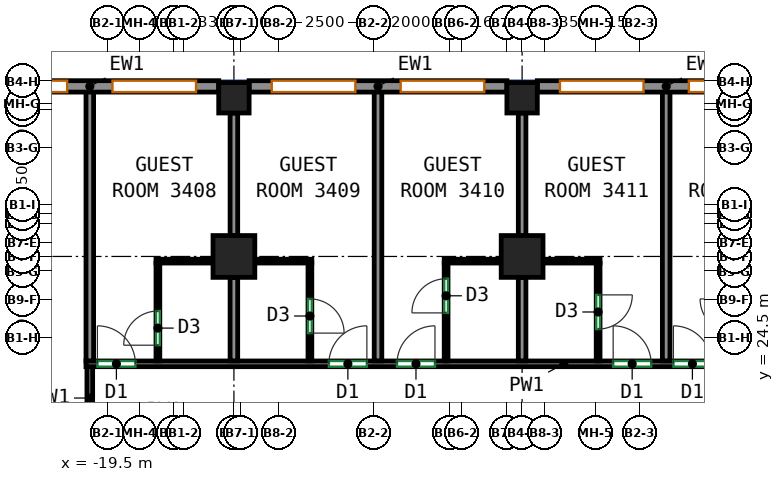
"""IFC4 building model, lengths in metres.
Left out: names, types, materials, properties, quantities, classifications, styles, units other than length and angle.
Written with IfcOpenShell. Run it as: python <this file> out.ifc"""

import sys

from ifc_helpers import new_model, si_unit, direction, frame, frame_2d, origin, origin_2d, place, context, subcontext, project, spatial, rectangle, extrude, source, transform, mapped, element, fill, save


model = new_model("IFC4")
c1 = context("Model", 3, precision=1e-05, world=origin(), true_north=direction((0.0, 1.0)))
c2 = subcontext(c1, "Body", "Model", "MODEL_VIEW")
j1 = project(units=[si_unit("LENGTHUNIT", "METRE"), si_unit("PLANEANGLEUNIT", "RADIAN")], contexts=[c1])
p1 = place(None, origin())
s1 = spatial("IfcSite", under=j1, at=p1, CompositionType="ELEMENT")
p2 = place(p1, origin())
s2 = spatial("IfcBuilding", under=s1, at=p2, CompositionType="ELEMENT")
p3 = place(p2, frame((0.0, 0.0, 150.7)))
s3 = spatial("IfcBuildingStorey", under=s2, at=p3, CompositionType="ELEMENT", Elevation=150.7)
m1 = source(origin(), c2, "Body", "SweptSolid", [
    extrude(rectangle(XDim=1.1, YDim=1.1, at=origin_2d()), origin(), (0.0, 0.0, 1.0), 3.12),
])
p4 = place(p3, frame((-16.167, 26.625, 0.0), z_axis=(0.0, 0.0, 1.0), x_axis=(1.0, 0.0, 0.0)))
e1 = element("IfcColumn", 1, at=p4, inside=s3, PredefinedType="COLUMN", context=c2, shape_type="MappedRepresentation", body=[
    mapped(m1, transform((0.0, 0.0, 0.0))),
])
m2 = source(origin(), c2, "Body", "SweptSolid", [
    extrude(rectangle(XDim=0.8, YDim=0.8, at=origin_2d()), origin(), (0.0, 0.0, 1.0), 3.12),
])
p5 = place(p3, frame((-16.167, 30.8, 0.0), z_axis=(0.0, 0.0, 1.0), x_axis=(1.0, 0.0, 0.0)))
e2 = element("IfcColumn", 2, at=p5, inside=s3, PredefinedType="COLUMN", context=c2, shape_type="MappedRepresentation", body=[
    mapped(m2, transform((0.0, 0.0, 0.0))),
])
p6 = place(p3, frame((-8.583, 26.625, 0.0), z_axis=(0.0, 0.0, 1.0), x_axis=(1.0, 0.0, 0.0)))
e3 = element("IfcColumn", 3, at=p6, inside=s3, PredefinedType="COLUMN", context=c2, shape_type="MappedRepresentation", body=[
    mapped(m1, transform((0.0, 0.0, 0.0))),
])
p7 = place(p3, frame((-8.583, 30.8, 0.0), z_axis=(0.0, 0.0, 1.0), x_axis=(1.0, 0.0, 0.0)))
e4 = element("IfcColumn", 4, at=p7, inside=s3, PredefinedType="COLUMN", context=c2, shape_type="MappedRepresentation", body=[
    mapped(m2, transform((0.0, 0.0, 0.0))),
])
m3 = source(origin(), c2, "Body", "SweptSolid", [
    extrude(rectangle(XDim=6.783, YDim=0.3, at=frame_2d((3.392, 0.0))), origin(), (0.0, 0.0, 1.0), 3.12),
])
p8 = place(p3, frame((-1.4, 31.1, 0.0), z_axis=(0.0, 0.0, 1.0), x_axis=(-1.0, 0.0, 0.0)))
e5 = element("IfcWall", 5, at=p8, inside=s3, PredefinedType="SOLIDWALL", context=c2, shape_type="MappedRepresentation", body=[
    mapped(m3, transform((0.0, 0.0, 0.0))),
])
p9 = place(p8, frame((0.596, 0.0, 0.85)))
e6 = element("IfcOpeningElement", 6, at=p9, cuts=e5, PredefinedType="OPENING", context=c2, shape_type="SweptSolid", body=[
    extrude(rectangle(XDim=2.2, YDim=1.95, at=frame_2d((1.1, 0.975))), frame((0.0, 0.16, 0.0), z_axis=(0.0, -1.0, 0.0), x_axis=(1.0, 0.0, 0.0)), (0.0, 0.0, 1.0), 0.32),
])
p10 = place(p8, frame((3.988, 0.0, 0.85)))
e7 = element("IfcOpeningElement", 7, at=p10, cuts=e5, PredefinedType="OPENING", context=c2, shape_type="SweptSolid", body=[
    extrude(rectangle(XDim=2.2, YDim=1.95, at=frame_2d((1.1, 0.975))), frame((0.0, 0.16, 0.0), z_axis=(0.0, -1.0, 0.0), x_axis=(1.0, 0.0, 0.0)), (0.0, 0.0, 1.0), 0.32),
])
m4 = source(origin(), c2, "Body", "SweptSolid", [
    extrude(rectangle(XDim=6.783, YDim=0.3, at=frame_2d((3.392, 0.0))), origin(), (0.0, 0.0, 1.0), 3.12),
])
p11 = place(p3, frame((-8.983, 31.1, 0.0), z_axis=(0.0, 0.0, 1.0), x_axis=(-1.0, 0.0, 0.0)))
e8 = element("IfcWall", 8, at=p11, inside=s3, PredefinedType="SOLIDWALL", context=c2, shape_type="MappedRepresentation", body=[
    mapped(m4, transform((0.0, 0.0, 0.0))),
])
p12 = place(p11, frame((0.596, 0.0, 0.85)))
e9 = element("IfcOpeningElement", 9, at=p12, cuts=e8, PredefinedType="OPENING", context=c2, shape_type="SweptSolid", body=[
    extrude(rectangle(XDim=2.2, YDim=1.95, at=frame_2d((1.1, 0.975))), frame((0.0, 0.16, 0.0), z_axis=(0.0, -1.0, 0.0), x_axis=(1.0, 0.0, 0.0)), (0.0, 0.0, 1.0), 0.32),
])
p13 = place(p11, frame((3.988, 0.0, 0.85)))
e10 = element("IfcOpeningElement", 10, at=p13, cuts=e8, PredefinedType="OPENING", context=c2, shape_type="SweptSolid", body=[
    extrude(rectangle(XDim=2.2, YDim=1.95, at=frame_2d((1.1, 0.975))), frame((0.0, 0.16, 0.0), z_axis=(0.0, -1.0, 0.0), x_axis=(1.0, 0.0, 0.0)), (0.0, 0.0, 1.0), 0.32),
])
p14 = place(p3, frame((-16.567, 31.1, 0.0), z_axis=(0.0, 0.0, 1.0), x_axis=(-1.0, 0.0, 0.0)))
e11 = element("IfcWall", 11, at=p14, inside=s3, PredefinedType="SOLIDWALL", context=c2, shape_type="MappedRepresentation", body=[
    mapped(m3, transform((0.0, 0.0, 0.0))),
])
p15 = place(p14, frame((0.596, 0.0, 0.85)))
e12 = element("IfcOpeningElement", 12, at=p15, cuts=e11, PredefinedType="OPENING", context=c2, shape_type="SweptSolid", body=[
    extrude(rectangle(XDim=2.2, YDim=1.95, at=frame_2d((1.1, 0.975))), frame((0.0, 0.16, 0.0), z_axis=(0.0, -1.0, 0.0), x_axis=(1.0, 0.0, 0.0)), (0.0, 0.0, 1.0), 0.32),
])
p16 = place(p14, frame((3.988, 0.0, 0.85)))
e13 = element("IfcOpeningElement", 13, at=p16, cuts=e11, PredefinedType="OPENING", context=c2, shape_type="SweptSolid", body=[
    extrude(rectangle(XDim=2.2, YDim=1.95, at=frame_2d((1.1, 0.975))), frame((0.0, 0.16, 0.0), z_axis=(0.0, -1.0, 0.0), x_axis=(1.0, 0.0, 0.0)), (0.0, 0.0, 1.0), 0.32),
])
p17 = place(p3, frame((-19.959, 22.075, 0.0), z_axis=(0.0, 0.0, 1.0), x_axis=(0.0, 1.0, 0.0)))
e14 = element("IfcWall", 14, at=p17, inside=s3, PredefinedType="PARTITIONING", context=c2, shape_type="SweptSolid", body=[
    extrude(rectangle(XDim=1.65, YDim=0.15, at=frame_2d((0.825, 0.0))), origin(), (0.0, 0.0, 1.0), 3.12),
])
p18 = place(p3, frame((-20.059, 23.8, 0.0), z_axis=(0.0, 0.0, 1.0), x_axis=(1.0, 0.0, 0.0)))
e15 = element("IfcWall", 15, at=p18, inside=s3, PredefinedType="PARTITIONING", context=c2, shape_type="SweptSolid", body=[
    extrude(rectangle(XDim=41.909, YDim=0.15, at=frame_2d((20.955, 0.0))), origin(), (0.0, 0.0, 1.0), 3.12),
])
p19 = place(p18, frame((0.3, 0.0, 0.0)))
e16 = element("IfcOpeningElement", 16, at=p19, cuts=e15, PredefinedType="OPENING", context=c2, shape_type="SweptSolid", body=[
    extrude(rectangle(XDim=1.0, YDim=2.1, at=frame_2d((0.5, 1.05))), frame((0.0, 0.085, 0.0), z_axis=(0.0, -1.0, 0.0), x_axis=(1.0, 0.0, 0.0)), (0.0, 0.0, 1.0), 0.17),
])
p20 = place(p18, frame((6.391, 0.0, 0.0)))
e17 = element("IfcOpeningElement", 17, at=p20, cuts=e15, PredefinedType="OPENING", context=c2, shape_type="SweptSolid", body=[
    extrude(rectangle(XDim=1.0, YDim=2.1, at=frame_2d((0.5, 1.05))), frame((0.0, 0.085, 0.0), z_axis=(0.0, -1.0, 0.0), x_axis=(1.0, 0.0, 0.0)), (0.0, 0.0, 1.0), 0.17),
])
p21 = place(p18, frame((8.183, 0.0, 0.0)))
e18 = element("IfcOpeningElement", 18, at=p21, cuts=e15, PredefinedType="OPENING", context=c2, shape_type="SweptSolid", body=[
    extrude(rectangle(XDim=1.0, YDim=2.1, at=frame_2d((0.5, 1.05))), frame((0.0, 0.085, 0.0), z_axis=(0.0, -1.0, 0.0), x_axis=(1.0, 0.0, 0.0)), (0.0, 0.0, 1.0), 0.17),
])
p22 = place(p18, frame((13.872, 0.0, 0.0)))
e19 = element("IfcOpeningElement", 19, at=p22, cuts=e15, PredefinedType="OPENING", context=c2, shape_type="SweptSolid", body=[
    extrude(rectangle(XDim=1.0, YDim=2.1, at=frame_2d((0.5, 1.05))), frame((0.0, 0.085, 0.0), z_axis=(0.0, -1.0, 0.0), x_axis=(1.0, 0.0, 0.0)), (0.0, 0.0, 1.0), 0.17),
])
p23 = place(p18, frame((15.457, 0.0, 0.0)))
e20 = element("IfcOpeningElement", 20, at=p23, cuts=e15, PredefinedType="OPENING", context=c2, shape_type="SweptSolid", body=[
    extrude(rectangle(XDim=1.0, YDim=2.1, at=frame_2d((0.5, 1.05))), frame((0.0, 0.085, 0.0), z_axis=(0.0, -1.0, 0.0), x_axis=(1.0, 0.0, 0.0)), (0.0, 0.0, 1.0), 0.17),
])
p24 = place(p18, frame((21.199, 0.0, 0.0)))
e21 = element("IfcOpeningElement", 21, at=p24, cuts=e15, PredefinedType="OPENING", context=c2, shape_type="SweptSolid", body=[
    extrude(rectangle(XDim=1.0, YDim=2.1, at=frame_2d((0.5, 1.05))), frame((0.0, 0.085, 0.0), z_axis=(0.0, -1.0, 0.0), x_axis=(1.0, 0.0, 0.0)), (0.0, 0.0, 1.0), 0.17),
])
p25 = place(p18, frame((23.212, 0.0, 0.0)))
e22 = element("IfcOpeningElement", 22, at=p25, cuts=e15, PredefinedType="OPENING", context=c2, shape_type="SweptSolid", body=[
    extrude(rectangle(XDim=1.0, YDim=2.1, at=frame_2d((0.5, 1.05))), frame((0.0, 0.085, 0.0), z_axis=(0.0, -1.0, 0.0), x_axis=(1.0, 0.0, 0.0)), (0.0, 0.0, 1.0), 0.17),
])
p26 = place(p18, frame((28.832, 0.0, 0.0)))
e23 = element("IfcOpeningElement", 23, at=p26, cuts=e15, PredefinedType="OPENING", context=c2, shape_type="SweptSolid", body=[
    extrude(rectangle(XDim=1.0, YDim=2.1, at=frame_2d((0.5, 1.05))), frame((0.0, 0.085, 0.0), z_axis=(0.0, -1.0, 0.0), x_axis=(1.0, 0.0, 0.0)), (0.0, 0.0, 1.0), 0.17),
])
p27 = place(p18, frame((30.83, 0.0, 0.0)))
e24 = element("IfcOpeningElement", 24, at=p27, cuts=e15, PredefinedType="OPENING", context=c2, shape_type="SweptSolid", body=[
    extrude(rectangle(XDim=1.0, YDim=2.1, at=frame_2d((0.5, 1.05))), frame((0.0, 0.085, 0.0), z_axis=(0.0, -1.0, 0.0), x_axis=(1.0, 0.0, 0.0)), (0.0, 0.0, 1.0), 0.17),
])
p28 = place(p18, frame((36.519, 0.0, 0.0)))
e25 = element("IfcOpeningElement", 25, at=p28, cuts=e15, PredefinedType="OPENING", context=c2, shape_type="SweptSolid", body=[
    extrude(rectangle(XDim=1.0, YDim=2.1, at=frame_2d((0.5, 1.05))), frame((0.0, 0.085, 0.0), z_axis=(0.0, -1.0, 0.0), x_axis=(1.0, 0.0, 0.0)), (0.0, 0.0, 1.0), 0.17),
])
p29 = place(p18, frame((38.311, 0.0, 0.0)))
e26 = element("IfcOpeningElement", 26, at=p29, cuts=e15, PredefinedType="OPENING", context=c2, shape_type="SweptSolid", body=[
    extrude(rectangle(XDim=1.0, YDim=2.1, at=frame_2d((0.5, 1.05))), frame((0.0, 0.085, 0.0), z_axis=(0.0, -1.0, 0.0), x_axis=(1.0, 0.0, 0.0)), (0.0, 0.0, 1.0), 0.17),
])
p30 = place(p3, frame((-19.959, 23.877, 0.0), z_axis=(0.0, 0.0, 1.0), x_axis=(0.0, 1.0, 0.0)))
e27 = element("IfcWall", 27, at=p30, inside=s3, PredefinedType="PARTITIONING", context=c2, shape_type="SweptSolid", body=[
    extrude(rectangle(XDim=7.123, YDim=0.2, at=frame_2d((3.562, 0.0))), origin(), (0.0, 0.0, 1.0), 3.12),
])
p31 = place(p3, frame((-18.217, 26.502, 0.0), z_axis=(0.0, 0.0, 1.0), x_axis=(1.0, 0.0, 0.0)))
e28 = element("IfcWall", 28, at=p31, inside=s3, PredefinedType="PARTITIONING", context=c2, shape_type="SweptSolid", body=[
    extrude(rectangle(XDim=1.5, YDim=0.1, at=frame_2d((0.75, 0.0))), origin(), (0.0, 0.0, 1.0), 3.12),
])
p32 = place(p3, frame((-18.167, 23.877, 0.0), z_axis=(0.0, 0.0, 1.0), x_axis=(0.0, 1.0, 0.0)))
e29 = element("IfcWall", 29, at=p32, inside=s3, PredefinedType="PARTITIONING", context=c2, shape_type="SweptSolid", body=[
    extrude(rectangle(XDim=2.575, YDim=0.1, at=frame_2d((1.288, 0.0))), origin(), (0.0, 0.0, 1.0), 3.12),
])
p33 = place(p32, frame((0.413, 0.0, 0.0)))
e30 = element("IfcOpeningElement", 30, at=p33, cuts=e29, PredefinedType="OPENING", context=c2, shape_type="SweptSolid", body=[
    extrude(rectangle(XDim=0.9, YDim=2.1, at=frame_2d((0.45, 1.05))), frame((0.0, 0.06, 0.0), z_axis=(0.0, -1.0, 0.0), x_axis=(1.0, 0.0, 0.0)), (0.0, 0.0, 1.0), 0.12),
])
p34 = place(p3, frame((-16.167, 27.175, 0.0), z_axis=(0.0, 0.0, 1.0), x_axis=(0.0, 1.0, 0.0)))
e31 = element("IfcWall", 31, at=p34, inside=s3, PredefinedType="PARTITIONING", context=c2, shape_type="SweptSolid", body=[
    extrude(rectangle(XDim=3.225, YDim=0.2, at=frame_2d((1.612, 0.0))), origin(), (0.0, 0.0, 1.0), 3.12),
])
p35 = place(p3, frame((-16.167, 23.877, 0.0), z_axis=(0.0, 0.0, 1.0), x_axis=(0.0, 1.0, 0.0)))
e32 = element("IfcWall", 32, at=p35, inside=s3, PredefinedType="PARTITIONING", context=c2, shape_type="SweptSolid", body=[
    extrude(rectangle(XDim=2.198, YDim=0.2, at=frame_2d((1.099, 0.0))), origin(), (0.0, 0.0, 1.0), 3.12),
])
p36 = place(p3, frame((-15.617, 26.502, 0.0), z_axis=(0.0, 0.0, 1.0), x_axis=(1.0, 0.0, 0.0)))
e33 = element("IfcWall", 33, at=p36, inside=s3, PredefinedType="PARTITIONING", context=c2, shape_type="SweptSolid", body=[
    extrude(rectangle(XDim=1.5, YDim=0.1, at=frame_2d((0.75, 0.0))), origin(), (0.0, 0.0, 1.0), 3.12),
])
p37 = place(p3, frame((-14.167, 26.452, 0.0), z_axis=(0.0, 0.0, 1.0), x_axis=(0.0, -1.0, 0.0)))
e34 = element("IfcWall", 34, at=p37, inside=s3, PredefinedType="PARTITIONING", context=c2, shape_type="SweptSolid", body=[
    extrude(rectangle(XDim=2.575, YDim=0.1, at=frame_2d((1.288, 0.0))), origin(), (0.0, 0.0, 1.0), 3.12),
])
p38 = place(p37, frame((0.944, 0.0, 0.0)))
e35 = element("IfcOpeningElement", 35, at=p38, cuts=e34, PredefinedType="OPENING", context=c2, shape_type="SweptSolid", body=[
    extrude(rectangle(XDim=0.9, YDim=2.1, at=frame_2d((0.45, 1.05))), frame((0.0, 0.06, 0.0), z_axis=(0.0, -1.0, 0.0), x_axis=(1.0, 0.0, 0.0)), (0.0, 0.0, 1.0), 0.12),
])
p39 = place(p3, frame((-12.375, 23.877, 0.0), z_axis=(0.0, 0.0, 1.0), x_axis=(0.0, 1.0, 0.0)))
e36 = element("IfcWall", 36, at=p39, inside=s3, PredefinedType="PARTITIONING", context=c2, shape_type="SweptSolid", body=[
    extrude(rectangle(XDim=7.123, YDim=0.2, at=frame_2d((3.562, 0.0))), origin(), (0.0, 0.0, 1.0), 3.12),
])
p40 = place(p3, frame((-10.633, 26.502, 0.0), z_axis=(0.0, 0.0, 1.0), x_axis=(1.0, 0.0, 0.0)))
e37 = element("IfcWall", 37, at=p40, inside=s3, PredefinedType="PARTITIONING", context=c2, shape_type="SweptSolid", body=[
    extrude(rectangle(XDim=1.5, YDim=0.1, at=frame_2d((0.75, 0.0))), origin(), (0.0, 0.0, 1.0), 3.12),
])
p41 = place(p3, frame((-10.583, 23.877, 0.0), z_axis=(0.0, 0.0, 1.0), x_axis=(0.0, 1.0, 0.0)))
e38 = element("IfcWall", 38, at=p41, inside=s3, PredefinedType="PARTITIONING", context=c2, shape_type="SweptSolid", body=[
    extrude(rectangle(XDim=2.575, YDim=0.1, at=frame_2d((1.288, 0.0))), origin(), (0.0, 0.0, 1.0), 3.12),
])
p42 = place(p41, frame((1.263, 0.0, 0.0)))
e39 = element("IfcOpeningElement", 39, at=p42, cuts=e38, PredefinedType="OPENING", context=c2, shape_type="SweptSolid", body=[
    extrude(rectangle(XDim=0.9, YDim=2.1, at=frame_2d((0.45, 1.05))), frame((0.0, 0.06, 0.0), z_axis=(0.0, -1.0, 0.0), x_axis=(1.0, 0.0, 0.0)), (0.0, 0.0, 1.0), 0.12),
])
p43 = place(p3, frame((-8.583, 27.175, 0.0), z_axis=(0.0, 0.0, 1.0), x_axis=(0.0, 1.0, 0.0)))
e40 = element("IfcWall", 40, at=p43, inside=s3, PredefinedType="PARTITIONING", context=c2, shape_type="SweptSolid", body=[
    extrude(rectangle(XDim=3.225, YDim=0.2, at=frame_2d((1.612, 0.0))), origin(), (0.0, 0.0, 1.0), 3.12),
])
p44 = place(p3, frame((-8.583, 23.877, 0.0), z_axis=(0.0, 0.0, 1.0), x_axis=(0.0, 1.0, 0.0)))
e41 = element("IfcWall", 41, at=p44, inside=s3, PredefinedType="PARTITIONING", context=c2, shape_type="SweptSolid", body=[
    extrude(rectangle(XDim=2.198, YDim=0.2, at=frame_2d((1.099, 0.0))), origin(), (0.0, 0.0, 1.0), 3.12),
])
p45 = place(p3, frame((-8.033, 26.502, 0.0), z_axis=(0.0, 0.0, 1.0), x_axis=(1.0, 0.0, 0.0)))
e42 = element("IfcWall", 42, at=p45, inside=s3, PredefinedType="PARTITIONING", context=c2, shape_type="SweptSolid", body=[
    extrude(rectangle(XDim=1.5, YDim=0.1, at=frame_2d((0.75, 0.0))), origin(), (0.0, 0.0, 1.0), 3.12),
])
p46 = place(p3, frame((-6.583, 26.452, 0.0), z_axis=(0.0, 0.0, 1.0), x_axis=(0.0, -1.0, 0.0)))
e43 = element("IfcWall", 43, at=p46, inside=s3, PredefinedType="PARTITIONING", context=c2, shape_type="SweptSolid", body=[
    extrude(rectangle(XDim=2.575, YDim=0.1, at=frame_2d((1.288, 0.0))), origin(), (0.0, 0.0, 1.0), 3.12),
])
p47 = place(p46, frame((0.838, 0.0, 0.0)))
e44 = element("IfcOpeningElement", 44, at=p47, cuts=e43, PredefinedType="OPENING", context=c2, shape_type="SweptSolid", body=[
    extrude(rectangle(XDim=0.9, YDim=2.1, at=frame_2d((0.45, 1.05))), frame((0.0, 0.06, 0.0), z_axis=(0.0, -1.0, 0.0), x_axis=(1.0, 0.0, 0.0)), (0.0, 0.0, 1.0), 0.12),
])
p48 = place(p3, frame((-4.792, 23.877, 0.0), z_axis=(0.0, 0.0, 1.0), x_axis=(0.0, 1.0, 0.0)))
e45 = element("IfcWall", 45, at=p48, inside=s3, PredefinedType="PARTITIONING", context=c2, shape_type="SweptSolid", body=[
    extrude(rectangle(XDim=7.123, YDim=0.2, at=frame_2d((3.562, 0.0))), origin(), (0.0, 0.0, 1.0), 3.12),
])
p49 = place(p9, origin())
e46 = element("IfcWindow", 46, at=p49, inside=s3, PartitioningType="SINGLE_PANEL", PredefinedType="WINDOW", context=c2, shape_type="SweptSolid", body=[
    extrude(rectangle(XDim=2.2, YDim=1.95, at=frame_2d((1.1, 0.975))), frame((0.0, 0.03, 0.0), z_axis=(0.0, -1.0, 0.0), x_axis=(1.0, 0.0, 0.0)), (0.0, 0.0, 1.0), 0.06),
])
fill(e6, e46)
p50 = place(p10, origin())
e47 = element("IfcWindow", 47, at=p50, inside=s3, PartitioningType="SINGLE_PANEL", PredefinedType="WINDOW", context=c2, shape_type="SweptSolid", body=[
    extrude(rectangle(XDim=2.2, YDim=1.95, at=frame_2d((1.1, 0.975))), frame((0.0, 0.03, 0.0), z_axis=(0.0, -1.0, 0.0), x_axis=(1.0, 0.0, 0.0)), (0.0, 0.0, 1.0), 0.06),
])
fill(e7, e47)
p51 = place(p12, origin())
e48 = element("IfcWindow", 48, at=p51, inside=s3, PartitioningType="SINGLE_PANEL", PredefinedType="WINDOW", context=c2, shape_type="SweptSolid", body=[
    extrude(rectangle(XDim=2.2, YDim=1.95, at=frame_2d((1.1, 0.975))), frame((0.0, 0.03, 0.0), z_axis=(0.0, -1.0, 0.0), x_axis=(1.0, 0.0, 0.0)), (0.0, 0.0, 1.0), 0.06),
])
fill(e9, e48)
p52 = place(p13, origin())
e49 = element("IfcWindow", 49, at=p52, inside=s3, PartitioningType="SINGLE_PANEL", PredefinedType="WINDOW", context=c2, shape_type="SweptSolid", body=[
    extrude(rectangle(XDim=2.2, YDim=1.95, at=frame_2d((1.1, 0.975))), frame((0.0, 0.03, 0.0), z_axis=(0.0, -1.0, 0.0), x_axis=(1.0, 0.0, 0.0)), (0.0, 0.0, 1.0), 0.06),
])
fill(e10, e49)
p53 = place(p15, origin())
e50 = element("IfcWindow", 50, at=p53, inside=s3, PartitioningType="SINGLE_PANEL", PredefinedType="WINDOW", context=c2, shape_type="SweptSolid", body=[
    extrude(rectangle(XDim=2.2, YDim=1.95, at=frame_2d((1.1, 0.975))), frame((0.0, 0.03, 0.0), z_axis=(0.0, -1.0, 0.0), x_axis=(1.0, 0.0, 0.0)), (0.0, 0.0, 1.0), 0.06),
])
fill(e12, e50)
p54 = place(p16, origin())
e51 = element("IfcWindow", 51, at=p54, inside=s3, PartitioningType="SINGLE_PANEL", PredefinedType="WINDOW", context=c2, shape_type="SweptSolid", body=[
    extrude(rectangle(XDim=2.2, YDim=1.95, at=frame_2d((1.1, 0.975))), frame((0.0, 0.03, 0.0), z_axis=(0.0, -1.0, 0.0), x_axis=(1.0, 0.0, 0.0)), (0.0, 0.0, 1.0), 0.06),
])
fill(e13, e51)
p55 = place(p19, origin())
e52 = element("IfcDoor", 52, at=p55, inside=s3, OperationType="SINGLE_SWING_LEFT", PredefinedType="DOOR", context=c2, shape_type="SweptSolid", body=[
    extrude(rectangle(XDim=1.0, YDim=2.1, at=frame_2d((0.5, 1.05))), frame((0.0, 0.025, 0.0), z_axis=(0.0, -1.0, 0.0), x_axis=(1.0, 0.0, 0.0)), (0.0, 0.0, 1.0), 0.05),
])
fill(e16, e52)
p56 = place(p20, origin())
e53 = element("IfcDoor", 53, at=p56, inside=s3, OperationType="SINGLE_SWING_RIGHT", PredefinedType="DOOR", context=c2, shape_type="SweptSolid", body=[
    extrude(rectangle(XDim=1.0, YDim=2.1, at=frame_2d((0.5, 1.05))), frame((0.0, 0.025, 0.0), z_axis=(0.0, -1.0, 0.0), x_axis=(1.0, 0.0, 0.0)), (0.0, 0.0, 1.0), 0.05),
])
fill(e17, e53)
p57 = place(p21, origin())
e54 = element("IfcDoor", 54, at=p57, inside=s3, OperationType="SINGLE_SWING_RIGHT", PredefinedType="DOOR", context=c2, shape_type="SweptSolid", body=[
    extrude(rectangle(XDim=1.0, YDim=2.1, at=frame_2d((0.5, 1.05))), frame((0.0, 0.025, 0.0), z_axis=(0.0, -1.0, 0.0), x_axis=(1.0, 0.0, 0.0)), (0.0, 0.0, 1.0), 0.05),
])
fill(e18, e54)
p58 = place(p22, origin())
e55 = element("IfcDoor", 55, at=p58, inside=s3, OperationType="SINGLE_SWING_LEFT", PredefinedType="DOOR", context=c2, shape_type="SweptSolid", body=[
    extrude(rectangle(XDim=1.0, YDim=2.1, at=frame_2d((0.5, 1.05))), frame((0.0, 0.025, 0.0), z_axis=(0.0, -1.0, 0.0), x_axis=(1.0, 0.0, 0.0)), (0.0, 0.0, 1.0), 0.05),
])
fill(e19, e55)
p59 = place(p23, origin())
e56 = element("IfcDoor", 56, at=p59, inside=s3, OperationType="SINGLE_SWING_LEFT", PredefinedType="DOOR", context=c2, shape_type="SweptSolid", body=[
    extrude(rectangle(XDim=1.0, YDim=2.1, at=frame_2d((0.5, 1.05))), frame((0.0, 0.025, 0.0), z_axis=(0.0, -1.0, 0.0), x_axis=(1.0, 0.0, 0.0)), (0.0, 0.0, 1.0), 0.05),
])
fill(e20, e56)
p60 = place(p33, origin())
e57 = element("IfcDoor", 57, at=p60, inside=s3, OperationType="SINGLE_SWING_LEFT", PredefinedType="DOOR", context=c2, shape_type="SweptSolid", body=[
    extrude(rectangle(XDim=0.9, YDim=2.1, at=frame_2d((0.45, 1.05))), frame((0.0, 0.025, 0.0), z_axis=(0.0, -1.0, 0.0), x_axis=(1.0, 0.0, 0.0)), (0.0, 0.0, 1.0), 0.05),
])
fill(e30, e57)
p61 = place(p38, origin())
e58 = element("IfcDoor", 58, at=p61, inside=s3, OperationType="SINGLE_SWING_RIGHT", PredefinedType="DOOR", context=c2, shape_type="SweptSolid", body=[
    extrude(rectangle(XDim=0.9, YDim=2.1, at=frame_2d((0.45, 1.05))), frame((0.0, 0.025, 0.0), z_axis=(0.0, -1.0, 0.0), x_axis=(1.0, 0.0, 0.0)), (0.0, 0.0, 1.0), 0.05),
])
fill(e35, e58)
p62 = place(p47, origin())
e59 = element("IfcDoor", 59, at=p62, inside=s3, OperationType="SINGLE_SWING_LEFT", PredefinedType="DOOR", context=c2, shape_type="SweptSolid", body=[
    extrude(rectangle(XDim=0.9, YDim=2.1, at=frame_2d((0.45, 1.05))), frame((0.0, 0.025, 0.0), z_axis=(0.0, -1.0, 0.0), x_axis=(1.0, 0.0, 0.0)), (0.0, 0.0, 1.0), 0.05),
])
fill(e44, e59)
p63 = place(p42, origin())
e60 = element("IfcDoor", 60, at=p63, inside=s3, OperationType="SINGLE_SWING_LEFT", PredefinedType="DOOR", context=c2, shape_type="SweptSolid", body=[
    extrude(rectangle(XDim=0.9, YDim=2.1, at=frame_2d((0.45, 1.05))), frame((0.0, 0.025, 0.0), z_axis=(0.0, -1.0, 0.0), x_axis=(1.0, 0.0, 0.0)), (0.0, 0.0, 1.0), 0.05),
])
fill(e39, e60)
save(model, sys.argv[1])
